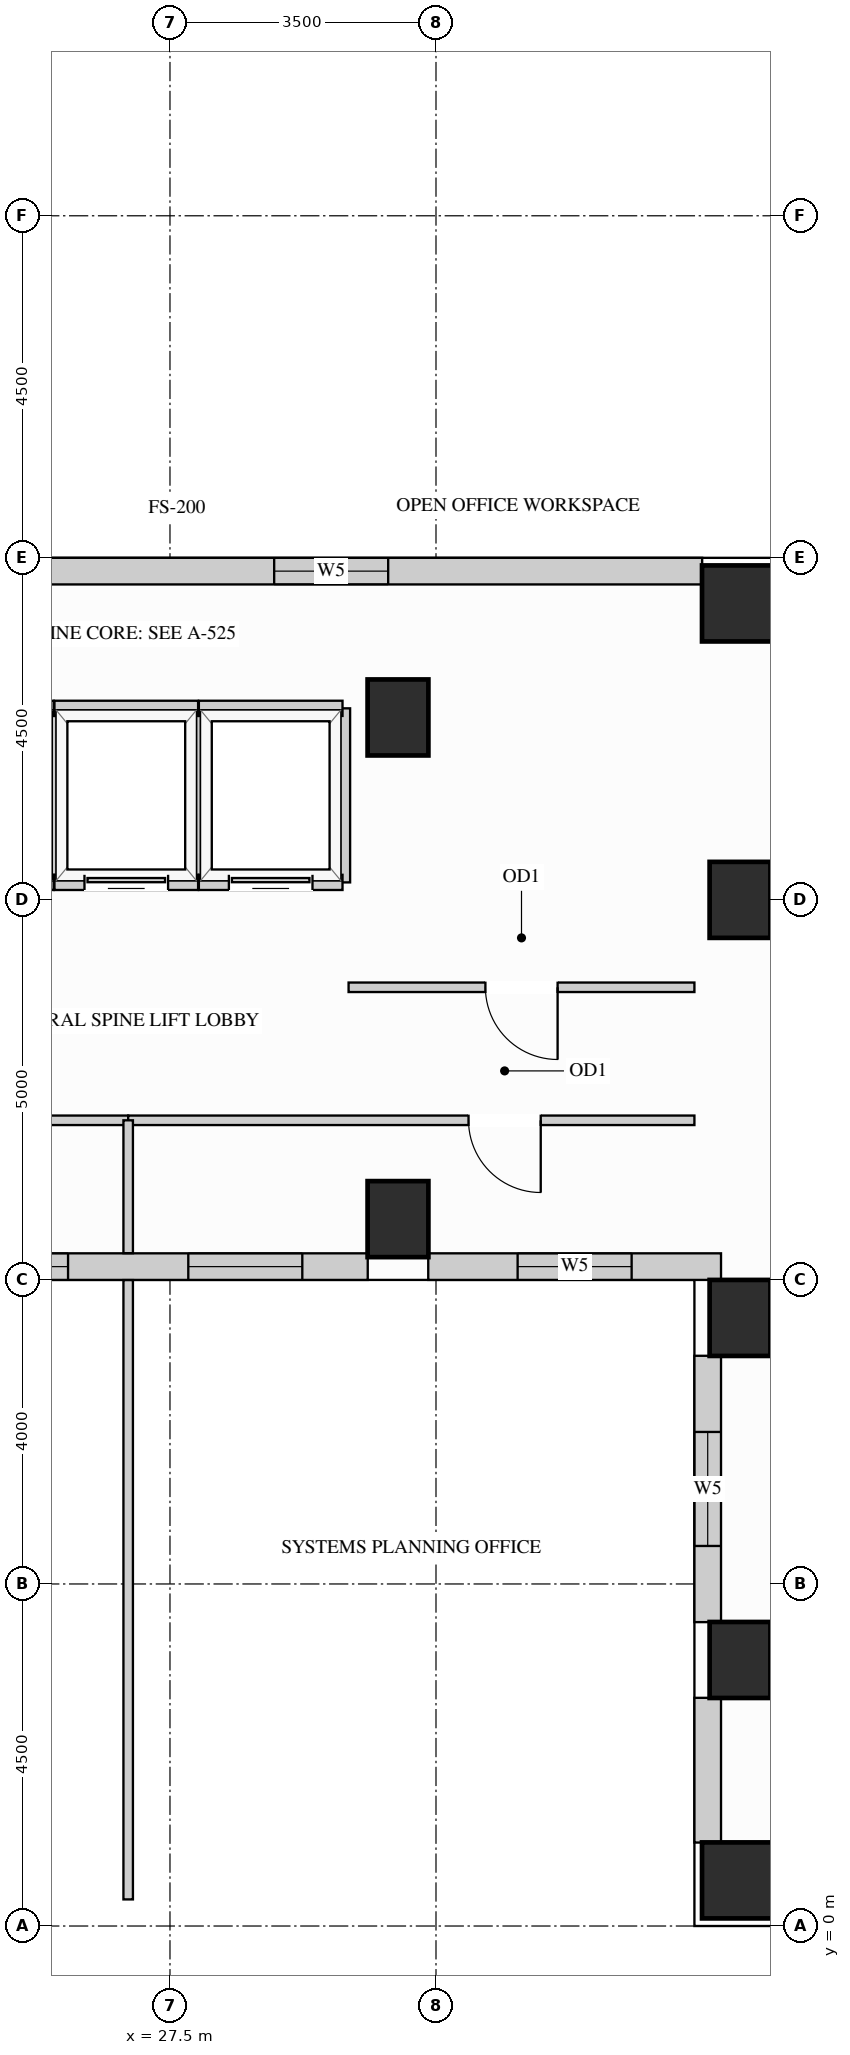
"""IFC4 building model, lengths in metres.
Left out: names, types, materials, properties, quantities, classifications, styles, units other than length and angle.
Written with IfcOpenShell. Run it as: python <this file> out.ifc"""

import sys

from ifc_helpers import new_model, si_unit, direction, frame, frame_2d, origin, origin_2d, place, context, subcontext, project, spatial, rectangle, extrude, source, transform, mapped, element, fill, save


model = new_model("IFC4")
c1 = context("Model", 3, precision=1e-05, world=origin(), true_north=direction((0.0, 1.0)))
c2 = subcontext(c1, "Body", "Model", "MODEL_VIEW")
j1 = project(units=[si_unit("LENGTHUNIT", "METRE"), si_unit("PLANEANGLEUNIT", "RADIAN")], contexts=[c1])
p1 = place(None, origin())
s1 = spatial("IfcSite", under=j1, at=p1, CompositionType="ELEMENT")
p2 = place(p1, origin())
s2 = spatial("IfcBuilding", under=s1, at=p2, CompositionType="ELEMENT")
p3 = place(p2, frame((0.0, 0.0, 197.1)))
s3 = spatial("IfcBuildingStorey", under=s2, at=p3, CompositionType="ELEMENT", Elevation=197.1)
m1 = source(origin(), c2, "Body", "SweptSolid", [
    extrude(rectangle(XDim=0.8, YDim=1.0, at=origin_2d()), origin(), (0.0, 0.0, 1.0), 3.4),
])
for number, where, z_axis, x_axis in (
    (1, (35.0, 13.5, 0.0), (0.0, 0.0, 1.0), (1.0, 0.0, 0.0)),
    (2, (35.0, 3.5, 0.0), (0.0, 0.0, 1.0), (1.0, 0.0, 0.0)),
    (3, (35.0, 8.0, 0.0), (0.0, 0.0, 1.0), (1.0, 0.0, 0.0)),
    (4, (30.5, 15.9, 0.0), (0.0, 0.0, 1.0), (1.0, 0.0, 0.0)),
    (5, (30.5, 9.3, 0.0), (0.0, 0.0, 1.0), (1.0, 0.0, 0.0)),
):
    element("IfcColumn", number, at=place(p3, frame(where, z_axis=z_axis, x_axis=x_axis)), inside=s3, PredefinedType="COLUMN", context=c2, shape_type="MappedRepresentation", body=[
        mapped(m1, transform((0.0, 0.0, 0.0), x_axis=(1.0, 0.0, 0.0), y_axis=(0.0, 1.0, 0.0), z_axis=(0.0, 0.0, 1.0))),
    ])
m2 = source(origin(), c2, "Body", "SweptSolid", [
    extrude(rectangle(XDim=1.0, YDim=1.0, at=origin_2d()), origin(), (0.0, 0.0, 1.0), 3.4),
])
for number, where, z_axis, x_axis in (
    (6, (35.0, 17.4, 0.0), (0.0, 0.0, 1.0), (1.0, 0.0, 0.0)),
    (7, (35.0, 0.6, 0.0), (0.0, 0.0, 1.0), (1.0, 0.0, 0.0)),
):
    element("IfcColumn", number, at=place(p3, frame(where, z_axis=z_axis, x_axis=x_axis)), inside=s3, PredefinedType="COLUMN", context=c2, shape_type="MappedRepresentation", body=[
        mapped(m2, transform((0.0, 0.0, 0.0), x_axis=(1.0, 0.0, 0.0), y_axis=(0.0, 1.0, 0.0), z_axis=(0.0, 0.0, 1.0))),
    ])
p4 = place(p3, frame((23.798, 8.675, 0.0), z_axis=(0.0, 0.0, 1.0), x_axis=(1.0, 0.0, 0.0)))
e8 = element("IfcWall", 8, at=p4, inside=s3, PredefinedType="SOLIDWALL", context=c2, shape_type="SweptSolid", body=[
    extrude(rectangle(XDim=6.304, YDim=0.35, at=frame_2d((3.152, 0.0))), origin(), (0.0, 0.0, 1.0), 3.385),
])
p5 = place(p4, frame((0.861, 0.0, 0.78)))
e9 = element("IfcOpeningElement", 9, at=p5, cuts=e8, PredefinedType="OPENING", context=c2, shape_type="SweptSolid", body=[
    extrude(rectangle(XDim=1.5, YDim=2.0, at=frame_2d((0.75, 1.0))), frame((0.0, 0.185, 0.0), z_axis=(0.0, -1.0, 0.0), x_axis=(1.0, 0.0, 0.0)), (0.0, 0.0, 1.0), 0.37),
])
p6 = place(p4, frame((3.943, 0.0, 0.78)))
e10 = element("IfcOpeningElement", 10, at=p6, cuts=e8, PredefinedType="OPENING", context=c2, shape_type="SweptSolid", body=[
    extrude(rectangle(XDim=1.5, YDim=2.0, at=frame_2d((0.75, 1.0))), frame((0.0, 0.185, 0.0), z_axis=(0.0, -1.0, 0.0), x_axis=(1.0, 0.0, 0.0)), (0.0, 0.0, 1.0), 0.37),
])
p7 = place(p3, frame((30.898, 8.675, 0.0), z_axis=(0.0, 0.0, 1.0), x_axis=(1.0, 0.0, 0.0)))
e11 = element("IfcWall", 11, at=p7, inside=s3, PredefinedType="SOLIDWALL", context=c2, shape_type="SweptSolid", body=[
    extrude(rectangle(XDim=3.852, YDim=0.35, at=frame_2d((1.926, 0.0))), origin(), (0.0, 0.0, 1.0), 3.385),
])
p8 = place(p7, frame((1.176, 0.0, 0.78)))
e12 = element("IfcOpeningElement", 12, at=p8, cuts=e11, PredefinedType="OPENING", context=c2, shape_type="SweptSolid", body=[
    extrude(rectangle(XDim=1.5, YDim=2.0, at=frame_2d((0.75, 1.0))), frame((0.0, 0.185, 0.0), z_axis=(0.0, -1.0, 0.0), x_axis=(1.0, 0.0, 0.0)), (0.0, 0.0, 1.0), 0.37),
])
p9 = place(p3, frame((34.575, 7.502, 0.0), z_axis=(0.0, 0.0, 1.0), x_axis=(0.0, -1.0, 0.0)))
e13 = element("IfcWall", 13, at=p9, inside=s3, PredefinedType="SOLIDWALL", context=c2, shape_type="SweptSolid", body=[
    extrude(rectangle(XDim=3.504, YDim=0.35, at=frame_2d((1.752, 0.0))), origin(), (0.0, 0.0, 1.0), 2.612),
])
p10 = place(p9, frame((1.002, 0.0, 0.78)))
e14 = element("IfcOpeningElement", 14, at=p10, cuts=e13, PredefinedType="OPENING", context=c2, shape_type="SweptSolid", body=[
    extrude(rectangle(XDim=1.5, YDim=1.652, at=frame_2d((0.75, 0.826))), frame((0.0, 0.185, 0.0), z_axis=(0.0, -1.0, 0.0), x_axis=(1.0, 0.0, 0.0)), (0.0, 0.0, 1.0), 0.37),
])
m3 = source(origin(), c2, "Body", "SweptSolid", [
    extrude(rectangle(XDim=1.904, YDim=0.35, at=frame_2d((0.952, 0.0))), origin(), (0.0, 0.0, 1.0), 2.612),
])
p11 = place(p3, frame((34.575, 3.002, 0.0), z_axis=(0.0, 0.0, 1.0), x_axis=(0.0, -1.0, 0.0)))
e15 = element("IfcWall", 15, at=p11, inside=s3, PredefinedType="SOLIDWALL", context=c2, shape_type="MappedRepresentation", body=[
    mapped(m3, transform((0.0, 0.0, 0.0), x_axis=(1.0, 0.0, 0.0), y_axis=(0.0, 1.0, 0.0), z_axis=(0.0, 0.0, 1.0))),
])
p12 = place(p3, frame((34.502, 17.825, 0.0), z_axis=(0.0, 0.0, 1.0), x_axis=(-1.0, 0.0, 0.0)))
e16 = element("IfcWall", 16, at=p12, inside=s3, PredefinedType="SOLIDWALL", context=c2, shape_type="SweptSolid", body=[
    extrude(rectangle(XDim=15.104, YDim=0.35, at=frame_2d((7.552, 0.0))), origin(), (0.0, 0.0, 1.0), 3.385),
])
p13 = place(p12, frame((4.131, 0.0, 0.78)))
e17 = element("IfcOpeningElement", 17, at=p13, cuts=e16, PredefinedType="OPENING", context=c2, shape_type="SweptSolid", body=[
    extrude(rectangle(XDim=1.5, YDim=2.0, at=frame_2d((0.75, 1.0))), frame((0.0, 0.185, 0.0), z_axis=(0.0, -1.0, 0.0), x_axis=(1.0, 0.0, 0.0)), (0.0, 0.0, 1.0), 0.37),
])
p14 = place(p12, frame((9.442, 0.0, 0.78)))
e18 = element("IfcOpeningElement", 18, at=p14, cuts=e16, PredefinedType="OPENING", context=c2, shape_type="SweptSolid", body=[
    extrude(rectangle(XDim=1.5, YDim=2.0, at=frame_2d((0.75, 1.0))), frame((0.0, 0.185, 0.0), z_axis=(0.0, -1.0, 0.0), x_axis=(1.0, 0.0, 0.0)), (0.0, 0.0, 1.0), 0.37),
])
p15 = place(p3, frame((29.85, 12.35, 0.0), z_axis=(0.0, 0.0, 1.0), x_axis=(1.0, 0.0, 0.0)))
e19 = element("IfcWall", 19, at=p15, inside=s3, PredefinedType="PARTITIONING", context=c2, shape_type="SweptSolid", body=[
    extrude(rectangle(XDim=4.55, YDim=0.125, at=frame_2d((2.275, 0.0))), origin(), (0.0, 0.0, 1.0), 3.385),
])
p16 = place(p15, frame((1.8, 0.0, 0.0)))
e20 = element("IfcOpeningElement", 20, at=p16, cuts=e19, PredefinedType="OPENING", context=c2, shape_type="SweptSolid", body=[
    extrude(rectangle(XDim=0.95, YDim=2.15, at=frame_2d((0.475, 1.075))), frame((0.0, 0.073, 0.0), z_axis=(0.0, -1.0, 0.0), x_axis=(1.0, 0.0, 0.0)), (0.0, 0.0, 1.0), 0.145),
])
p17 = place(p3, frame((19.5, 10.6, 0.0), z_axis=(0.0, 0.0, 1.0), x_axis=(1.0, 0.0, 0.0)))
e21 = element("IfcWall", 21, at=p17, inside=s3, PredefinedType="PARTITIONING", context=c2, shape_type="SweptSolid", body=[
    extrude(rectangle(XDim=7.45, YDim=0.125, at=frame_2d((3.725, 0.0))), origin(), (0.0, 0.0, 1.0), 3.385),
])
p18 = place(p17, frame((2.022, 0.0, 0.0)))
e22 = element("IfcOpeningElement", 22, at=p18, cuts=e21, PredefinedType="OPENING", context=c2, shape_type="SweptSolid", body=[
    extrude(rectangle(XDim=0.95, YDim=2.15, at=frame_2d((0.475, 1.075))), frame((0.0, 0.073, 0.0), z_axis=(0.0, -1.0, 0.0), x_axis=(1.0, 0.0, 0.0)), (0.0, 0.0, 1.0), 0.145),
])
p19 = place(p3, frame((26.95, 10.6, 0.0), z_axis=(0.0, 0.0, 1.0), x_axis=(1.0, 0.0, 0.0)))
e23 = element("IfcWall", 23, at=p19, inside=s3, PredefinedType="PARTITIONING", context=c2, shape_type="SweptSolid", body=[
    extrude(rectangle(XDim=7.45, YDim=0.125, at=frame_2d((3.725, 0.0))), origin(), (0.0, 0.0, 1.0), 3.385),
])
p20 = place(p19, frame((4.478, 0.0, 0.0)))
e24 = element("IfcOpeningElement", 24, at=p20, cuts=e23, PredefinedType="OPENING", context=c2, shape_type="SweptSolid", body=[
    extrude(rectangle(XDim=0.95, YDim=2.15, at=frame_2d((0.475, 1.075))), frame((0.0, 0.073, 0.0), z_axis=(0.0, -1.0, 0.0), x_axis=(1.0, 0.0, 0.0)), (0.0, 0.0, 1.0), 0.145),
])
m4 = source(origin(), c2, "Body", "SweptSolid", [
    extrude(rectangle(XDim=8.148, YDim=0.125, at=frame_2d((4.074, 0.0))), origin(), (0.0, 0.0, 1.0), 3.385),
])
p21 = place(p3, frame((26.95, 0.35, 0.0), z_axis=(0.0, 0.0, 1.0), x_axis=(0.0, 1.0, 0.0)))
e25 = element("IfcWall", 25, at=p21, inside=s3, PredefinedType="PARTITIONING", context=c2, shape_type="MappedRepresentation", body=[
    mapped(m4, transform((0.0, 0.0, 0.0), x_axis=(1.0, 0.0, 0.0), y_axis=(0.0, 1.0, 0.0), z_axis=(0.0, 0.0, 1.0))),
])
m5 = source(origin(), c2, "Body", "SweptSolid", [
    extrude(rectangle(XDim=1.748, YDim=0.125, at=frame_2d((0.874, 0.0))), origin(), (0.0, 0.0, 1.0), 3.385),
])
p22 = place(p3, frame((26.95, 8.852, 0.0), z_axis=(0.0, 0.0, 1.0), x_axis=(0.0, 1.0, 0.0)))
e26 = element("IfcWall", 26, at=p22, inside=s3, PredefinedType="PARTITIONING", context=c2, shape_type="MappedRepresentation", body=[
    mapped(m5, transform((0.0, 0.0, 0.0), x_axis=(1.0, 0.0, 0.0), y_axis=(0.0, 1.0, 0.0), z_axis=(0.0, 0.0, 1.0))),
])
m6 = source(origin(), c2, "Body", "SweptSolid", [
    extrude(rectangle(XDim=2.29, YDim=0.2, at=frame_2d((1.145, 0.0))), origin(), (0.0, 0.0, 1.0), 3.385),
])
p23 = place(p3, frame((25.97, 13.73, 0.0), z_axis=(0.0, 0.0, 1.0), x_axis=(0.0, 1.0, 0.0)))
e27 = element("IfcWall", 27, at=p23, inside=s3, PredefinedType="PARTITIONING", context=c2, shape_type="MappedRepresentation", body=[
    mapped(m6, transform((0.0, 0.0, 0.0), x_axis=(1.0, 0.0, 0.0), y_axis=(0.0, 1.0, 0.0), z_axis=(0.0, 0.0, 1.0))),
])
m7 = source(origin(), c2, "Body", "SweptSolid", [
    extrude(rectangle(XDim=1.89, YDim=0.2, at=frame_2d((0.945, 0.0))), origin(), (0.0, 0.0, 1.0), 2.773),
])
p24 = place(p3, frame((24.08, 16.02, 0.0), z_axis=(0.0, 0.0, 1.0), x_axis=(1.0, 0.0, 0.0)))
e28 = element("IfcWall", 28, at=p24, inside=s3, PredefinedType="PARTITIONING", context=c2, shape_type="MappedRepresentation", body=[
    mapped(m7, transform((0.0, 0.0, 0.0), x_axis=(1.0, 0.0, 0.0), y_axis=(0.0, 1.0, 0.0), z_axis=(0.0, 0.0, 1.0))),
])
p25 = place(p3, frame((24.08, 13.73, 0.0), z_axis=(0.0, 0.0, 1.0), x_axis=(1.0, 0.0, 0.0)))
e29 = element("IfcWall", 29, at=p25, inside=s3, PredefinedType="PARTITIONING", context=c2, shape_type="SweptSolid", body=[
    extrude(rectangle(XDim=1.89, YDim=0.2, at=frame_2d((0.945, 0.0))), origin(), (0.0, 0.0, 1.0), 2.466),
])
p26 = place(p25, frame((0.395, 0.0, 0.0)))
e30 = element("IfcOpeningElement", 30, at=p26, cuts=e29, PredefinedType="OPENING", context=c2, shape_type="SweptSolid", body=[
    extrude(rectangle(XDim=1.1, YDim=2.2, at=frame_2d((0.55, 1.1))), frame((0.0, 0.11, 0.0), z_axis=(0.0, -1.0, 0.0), x_axis=(1.0, 0.0, 0.0)), (0.0, 0.0, 1.0), 0.22),
])
p27 = place(p3, frame((27.87, 13.73, 0.0), z_axis=(0.0, 0.0, 1.0), x_axis=(0.0, 1.0, 0.0)))
e31 = element("IfcWall", 31, at=p27, inside=s3, PredefinedType="PARTITIONING", context=c2, shape_type="MappedRepresentation", body=[
    mapped(m6, transform((0.0, 0.0, 0.0), x_axis=(1.0, 0.0, 0.0), y_axis=(0.0, 1.0, 0.0), z_axis=(0.0, 0.0, 1.0))),
])
m8 = source(origin(), c2, "Body", "SweptSolid", [
    extrude(rectangle(XDim=1.89, YDim=0.2, at=frame_2d((0.945, 0.0))), origin(), (0.0, 0.0, 1.0), 2.773),
])
p28 = place(p3, frame((25.98, 16.02, 0.0), z_axis=(0.0, 0.0, 1.0), x_axis=(1.0, 0.0, 0.0)))
e32 = element("IfcWall", 32, at=p28, inside=s3, PredefinedType="PARTITIONING", context=c2, shape_type="MappedRepresentation", body=[
    mapped(m8, transform((0.0, 0.0, 0.0), x_axis=(1.0, 0.0, 0.0), y_axis=(0.0, 1.0, 0.0), z_axis=(0.0, 0.0, 1.0))),
])
p29 = place(p3, frame((25.98, 13.73, 0.0), z_axis=(0.0, 0.0, 1.0), x_axis=(1.0, 0.0, 0.0)))
e33 = element("IfcWall", 33, at=p29, inside=s3, PredefinedType="PARTITIONING", context=c2, shape_type="SweptSolid", body=[
    extrude(rectangle(XDim=1.89, YDim=0.2, at=frame_2d((0.945, 0.0))), origin(), (0.0, 0.0, 1.0), 2.466),
])
p30 = place(p29, frame((0.395, 0.0, 0.0)))
e34 = element("IfcOpeningElement", 34, at=p30, cuts=e33, PredefinedType="OPENING", context=c2, shape_type="SweptSolid", body=[
    extrude(rectangle(XDim=1.1, YDim=2.2, at=frame_2d((0.55, 1.1))), frame((0.0, 0.11, 0.0), z_axis=(0.0, -1.0, 0.0), x_axis=(1.0, 0.0, 0.0)), (0.0, 0.0, 1.0), 0.22),
])
p31 = place(p3, frame((29.77, 13.73, 0.0), z_axis=(0.0, 0.0, 1.0), x_axis=(0.0, 1.0, 0.0)))
e35 = element("IfcWall", 35, at=p31, inside=s3, PredefinedType="PARTITIONING", context=c2, shape_type="MappedRepresentation", body=[
    mapped(m6, transform((0.0, 0.0, 0.0), x_axis=(1.0, 0.0, 0.0), y_axis=(0.0, 1.0, 0.0), z_axis=(0.0, 0.0, 1.0))),
])
p32 = place(p3, frame((27.88, 16.02, 0.0), z_axis=(0.0, 0.0, 1.0), x_axis=(1.0, 0.0, 0.0)))
e36 = element("IfcWall", 36, at=p32, inside=s3, PredefinedType="PARTITIONING", context=c2, shape_type="MappedRepresentation", body=[
    mapped(m8, transform((0.0, 0.0, 0.0), x_axis=(1.0, 0.0, 0.0), y_axis=(0.0, 1.0, 0.0), z_axis=(0.0, 0.0, 1.0))),
])
p33 = place(p3, frame((27.88, 13.73, 0.0), z_axis=(0.0, 0.0, 1.0), x_axis=(1.0, 0.0, 0.0)))
e37 = element("IfcWall", 37, at=p33, inside=s3, PredefinedType="PARTITIONING", context=c2, shape_type="SweptSolid", body=[
    extrude(rectangle(XDim=1.89, YDim=0.2, at=frame_2d((0.945, 0.0))), origin(), (0.0, 0.0, 1.0), 2.466),
])
p34 = place(p33, frame((0.395, 0.0, 0.0)))
e38 = element("IfcOpeningElement", 38, at=p34, cuts=e37, PredefinedType="OPENING", context=c2, shape_type="SweptSolid", body=[
    extrude(rectangle(XDim=1.1, YDim=2.2, at=frame_2d((0.55, 1.1))), frame((0.0, 0.11, 0.0), z_axis=(0.0, -1.0, 0.0), x_axis=(1.0, 0.0, 0.0)), (0.0, 0.0, 1.0), 0.22),
])
m9 = source(origin(), c2, "Body", "SweptSolid", [
    extrude(rectangle(XDim=1.1, YDim=2.2, at=frame_2d((0.55, 1.1))), frame((0.0, 0.025, 0.0), z_axis=(0.0, -1.0, 0.0), x_axis=(1.0, 0.0, 0.0)), (0.0, 0.0, 1.0), 0.05),
])
p35 = place(p30, origin())
e39 = element("IfcDoor", 39, at=p35, inside=s3, OperationType="SLIDING_TO_LEFT", PredefinedType="DOOR", context=c2, shape_type="MappedRepresentation", body=[
    mapped(m9, transform((0.0, 0.0, 0.0), x_axis=(1.0, 0.0, 0.0), y_axis=(0.0, 1.0, 0.0), z_axis=(0.0, 0.0, 1.0))),
])
fill(e34, e39)
p36 = place(p34, origin())
e40 = element("IfcDoor", 40, at=p36, inside=s3, OperationType="SLIDING_TO_LEFT", PredefinedType="DOOR", context=c2, shape_type="MappedRepresentation", body=[
    mapped(m9, transform((0.0, 0.0, 0.0), x_axis=(1.0, 0.0, 0.0), y_axis=(0.0, 1.0, 0.0), z_axis=(0.0, 0.0, 1.0))),
])
fill(e38, e40)
m10 = source(origin(), c2, "Body", "SweptSolid", [
    extrude(rectangle(XDim=0.95, YDim=2.15, at=frame_2d((0.475, 1.075))), frame((0.0, 0.025, 0.0), z_axis=(0.0, -1.0, 0.0), x_axis=(1.0, 0.0, 0.0)), (0.0, 0.0, 1.0), 0.05),
])
p37 = place(p16, origin())
e41 = element("IfcDoor", 41, at=p37, inside=s3, OperationType="SINGLE_SWING_RIGHT", PredefinedType="DOOR", context=c2, shape_type="MappedRepresentation", body=[
    mapped(m10, transform((0.0, 0.0, 0.0), x_axis=(1.0, 0.0, 0.0), y_axis=(0.0, 1.0, 0.0), z_axis=(0.0, 0.0, 1.0))),
])
fill(e20, e41)
p38 = place(p20, origin())
e42 = element("IfcDoor", 42, at=p38, inside=s3, OperationType="SINGLE_SWING_RIGHT", PredefinedType="DOOR", context=c2, shape_type="MappedRepresentation", body=[
    mapped(m10, transform((0.0, 0.0, 0.0), x_axis=(1.0, 0.0, 0.0), y_axis=(0.0, 1.0, 0.0), z_axis=(0.0, 0.0, 1.0))),
])
fill(e24, e42)
m11 = source(origin(), c2, "Body", "SweptSolid", [
    extrude(rectangle(XDim=1.5, YDim=2.0, at=frame_2d((0.75, 1.0))), frame((0.0, 0.03, 0.0), z_axis=(0.0, -1.0, 0.0), x_axis=(1.0, 0.0, 0.0)), (0.0, 0.0, 1.0), 0.06),
])
p39 = place(p5, origin())
e43 = element("IfcWindow", 43, at=p39, inside=s3, PartitioningType="SINGLE_PANEL", PredefinedType="WINDOW", context=c2, shape_type="MappedRepresentation", body=[
    mapped(m11, transform((0.0, 0.0, 0.0), x_axis=(1.0, 0.0, 0.0), y_axis=(0.0, 1.0, 0.0), z_axis=(0.0, 0.0, 1.0))),
])
fill(e9, e43)
p40 = place(p6, origin())
e44 = element("IfcWindow", 44, at=p40, inside=s3, PartitioningType="SINGLE_PANEL", PredefinedType="WINDOW", context=c2, shape_type="MappedRepresentation", body=[
    mapped(m11, transform((0.0, 0.0, 0.0), x_axis=(1.0, 0.0, 0.0), y_axis=(0.0, 1.0, 0.0), z_axis=(0.0, 0.0, 1.0))),
])
fill(e10, e44)
p41 = place(p8, origin())
e45 = element("IfcWindow", 45, at=p41, inside=s3, PartitioningType="SINGLE_PANEL", PredefinedType="WINDOW", context=c2, shape_type="MappedRepresentation", body=[
    mapped(m11, transform((0.0, 0.0, 0.0), x_axis=(1.0, 0.0, 0.0), y_axis=(0.0, 1.0, 0.0), z_axis=(0.0, 0.0, 1.0))),
])
fill(e12, e45)
m12 = source(origin(), c2, "Body", "SweptSolid", [
    extrude(rectangle(XDim=1.5, YDim=1.652, at=frame_2d((0.75, 0.826))), frame((0.0, 0.03, 0.0), z_axis=(0.0, -1.0, 0.0), x_axis=(1.0, 0.0, 0.0)), (0.0, 0.0, 1.0), 0.06),
])
p42 = place(p10, origin())
e46 = element("IfcWindow", 46, at=p42, inside=s3, PartitioningType="SINGLE_PANEL", PredefinedType="WINDOW", context=c2, shape_type="MappedRepresentation", body=[
    mapped(m12, transform((0.0, 0.0, 0.0), x_axis=(1.0, 0.0, 0.0), y_axis=(0.0, 1.0, 0.0), z_axis=(0.0, 0.0, 1.0))),
])
fill(e14, e46)
p43 = place(p13, origin())
e47 = element("IfcWindow", 47, at=p43, inside=s3, PartitioningType="SINGLE_PANEL", PredefinedType="WINDOW", context=c2, shape_type="MappedRepresentation", body=[
    mapped(m11, transform((0.0, 0.0, 0.0), x_axis=(1.0, 0.0, 0.0), y_axis=(0.0, 1.0, 0.0), z_axis=(0.0, 0.0, 1.0))),
])
fill(e17, e47)
save(model, sys.argv[1])
